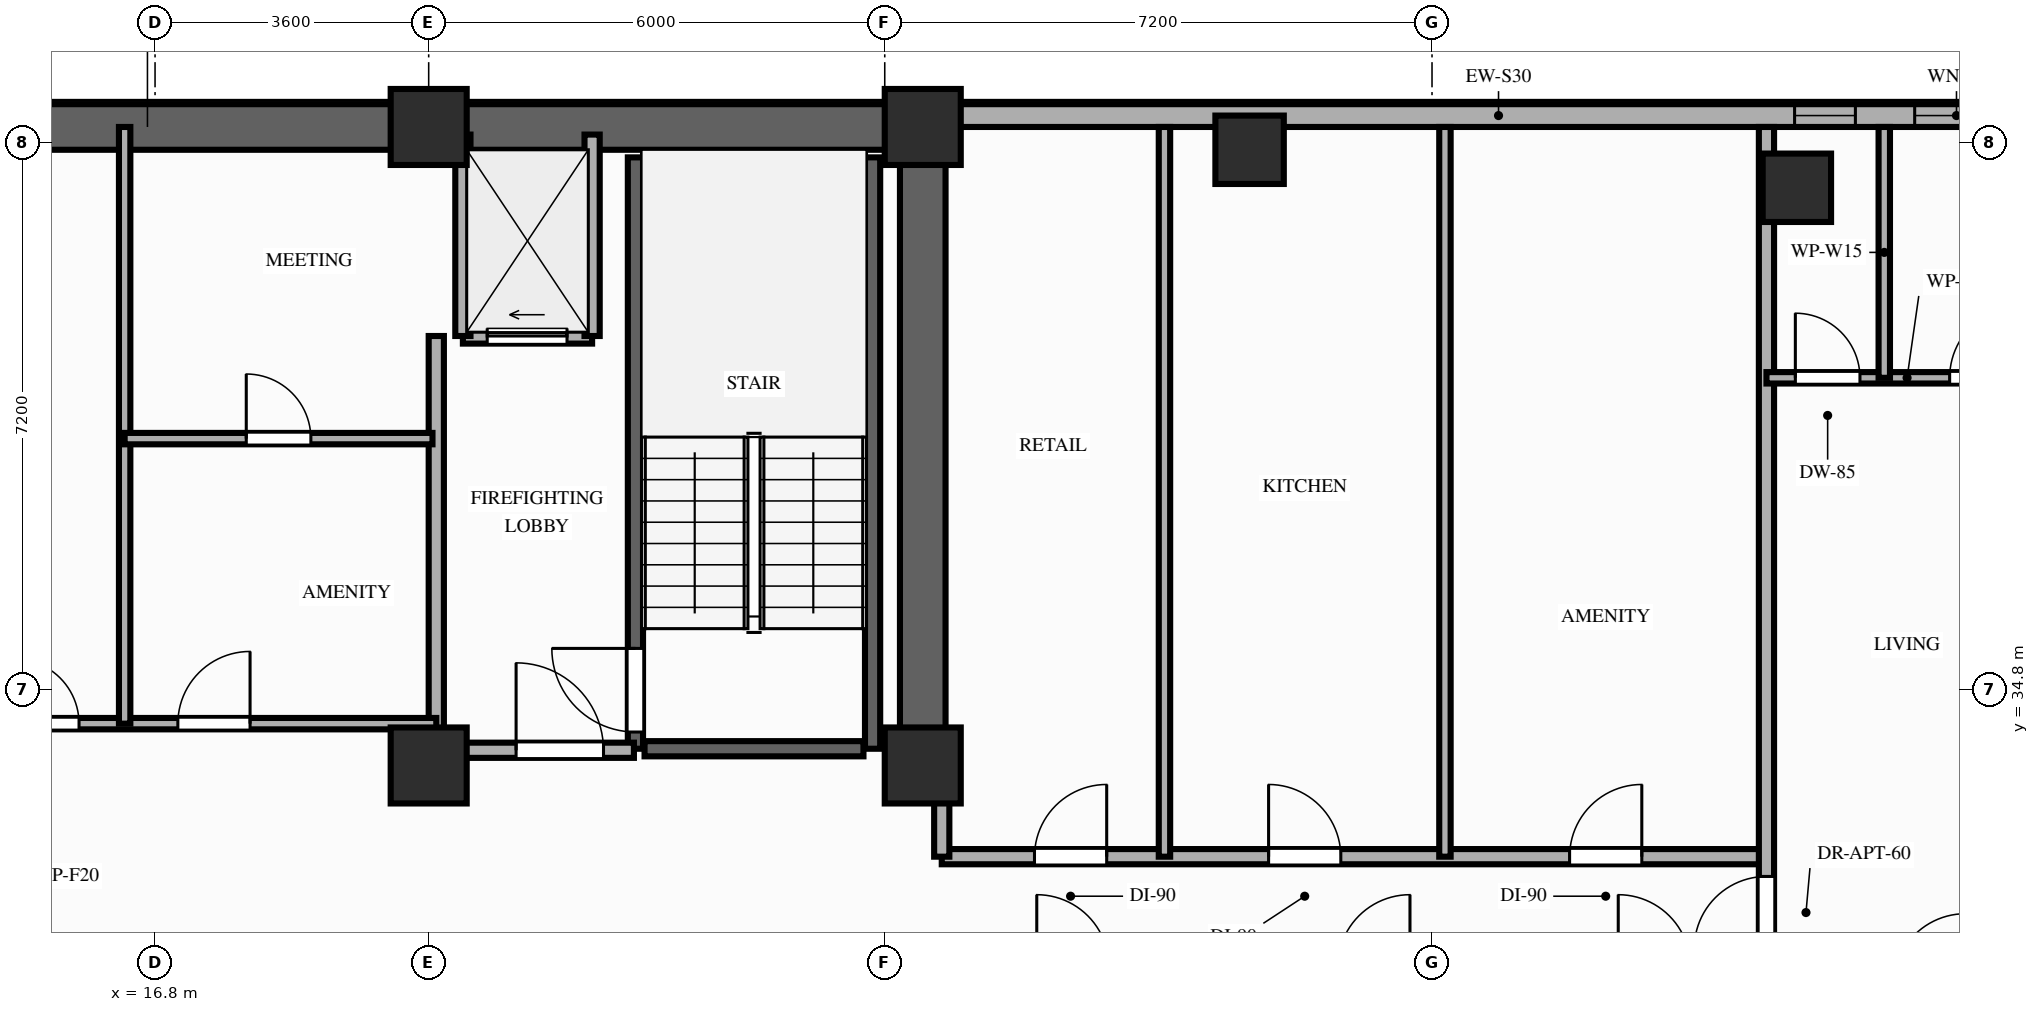
"""IFC4 building model, lengths in metres.
Left out: names, types, materials, properties, quantities, classifications, styles, units other than length and angle.
Written with IfcOpenShell. Run it as: python <this file> out.ifc"""

import sys

from ifc_helpers import new_model, si_unit, direction, frame, frame_2d, origin, origin_2d, place, context, subcontext, project, spatial, rectangle, extrude, element, fill, save


model = new_model("IFC4")
c1 = context("Model", 3, precision=1e-05, world=origin(), true_north=direction((0.0, 1.0)))
c2 = subcontext(c1, "Body", "Model", "MODEL_VIEW")
j1 = project(units=[si_unit("LENGTHUNIT", "METRE"), si_unit("PLANEANGLEUNIT", "RADIAN")], contexts=[c1])
p1 = place(None, origin())
s1 = spatial("IfcSite", under=j1, at=p1, CompositionType="ELEMENT")
p2 = place(p1, origin())
s2 = spatial("IfcBuilding", under=s1, at=p2, CompositionType="ELEMENT")
p3 = place(p2, frame((0.0, 0.0, 172.8)))
s3 = spatial("IfcBuildingStorey", under=s2, at=p3, CompositionType="ELEMENT", Elevation=172.8)
for number, where, z_axis, x_axis in (
    (1, (20.4, 33.8, 0.0), (0.0, 0.0, 1.0), (1.0, 0.0, 0.0)),
    (2, (26.9, 33.8, 0.0), (0.0, 0.0, 1.0), (1.0, 0.0, 0.0)),
    (3, (20.4, 42.2, 0.0), (0.0, 0.0, 1.0), (1.0, 0.0, 0.0)),
    (4, (26.9, 42.2, 0.0), (0.0, 0.0, 1.0), (1.0, 0.0, 0.0)),
):
    element("IfcColumn", number, at=place(p3, frame(where, z_axis=z_axis, x_axis=x_axis)), inside=s3, PredefinedType="COLUMN", context=c2, shape_type="SweptSolid", body=[
        extrude(rectangle(XDim=1.0, YDim=1.0, at=origin_2d()), origin(), (0.0, 0.0, 1.0), 3.2),
    ])
for number, where, z_axis, x_axis in (
    (5, (31.2, 41.9, 0.0), (0.0, 0.0, 1.0), (1.0, 0.0, 0.0)),
    (6, (38.4, 41.4, 0.0), (0.0, 0.0, 1.0), (1.0, 0.0, 0.0)),
):
    element("IfcColumn", number, at=place(p3, frame(where, z_axis=z_axis, x_axis=x_axis)), inside=s3, PredefinedType="COLUMN", context=c2, shape_type="SweptSolid", body=[
        extrude(rectangle(XDim=0.9, YDim=0.9, at=origin_2d()), origin(), (0.0, 0.0, 1.0), 3.2),
    ])
p4 = place(p3, frame((41.6, 42.35, 0.0), z_axis=(0.0, 0.0, 1.0), x_axis=(-1.0, 0.0, 0.0)))
e7 = element("IfcWall", 7, at=p4, inside=s3, PredefinedType="STANDARD", context=c2, shape_type="SweptSolid", body=[
    extrude(rectangle(XDim=14.25, YDim=0.3, at=frame_2d((7.125, 0.0))), origin(), (0.0, 0.0, 1.0), 2.45),
])
p5 = place(p4, frame((2.43, 0.0, 0.85)))
e8 = element("IfcOpeningElement", 8, at=p5, cuts=e7, PredefinedType="OPENING", context=c2, shape_type="SweptSolid", body=[
    extrude(rectangle(XDim=0.8, YDim=1.35, at=frame_2d((0.4, 0.675))), frame((0.0, 0.16, 0.0), z_axis=(0.0, -1.0, 0.0), x_axis=(1.0, 0.0, 0.0)), (0.0, 0.0, 1.0), 0.32),
])
p6 = place(p4, frame((0.55, 0.0, 0.85)))
e9 = element("IfcOpeningElement", 9, at=p6, cuts=e7, PredefinedType="OPENING", context=c2, shape_type="SweptSolid", body=[
    extrude(rectangle(XDim=1.1, YDim=1.35, at=frame_2d((0.55, 0.675))), frame((0.0, 0.16, 0.0), z_axis=(0.0, -1.0, 0.0), x_axis=(1.0, 0.0, 0.0)), (0.0, 0.0, 1.0), 0.32),
])
p7 = place(p3, frame((6.45, 42.2, 0.0), z_axis=(0.0, 0.0, 1.0), x_axis=(1.0, 0.0, 0.0)))
e10 = element("IfcWall", 10, at=p7, inside=s3, PredefinedType="SHEAR", context=c2, shape_type="SweptSolid", body=[
    extrude(rectangle(XDim=20.45, YDim=0.6, at=frame_2d((10.225, 0.0))), origin(), (0.0, 0.0, 1.0), 3.02),
])
p8 = place(p3, frame((26.9, 33.8, 0.0), z_axis=(0.0, 0.0, 1.0), x_axis=(0.0, 1.0, 0.0)))
e11 = element("IfcWall", 11, at=p8, inside=s3, PredefinedType="SHEAR", context=c2, shape_type="SweptSolid", body=[
    extrude(rectangle(XDim=7.95, YDim=0.6, at=frame_2d((3.975, 0.0))), origin(), (0.0, 0.0, 1.0), 3.02),
])
p9 = place(p3, frame((23.12, 34.02, 0.0), z_axis=(0.0, 0.0, 1.0), x_axis=(0.0, 1.0, 0.0)))
e12 = element("IfcWall", 12, at=p9, inside=s3, PredefinedType="SHEAR", context=c2, shape_type="SweptSolid", body=[
    extrude(rectangle(XDim=7.78, YDim=0.2, at=frame_2d((3.89, 0.0))), origin(), (0.0, 0.0, 1.0), 3.02),
])
p10 = place(p9, frame((0.22, 0.0, 0.0)))
e13 = element("IfcOpeningElement", 13, at=p10, cuts=e12, PredefinedType="OPENING", context=c2, shape_type="SweptSolid", body=[
    extrude(rectangle(XDim=1.1, YDim=2.15, at=frame_2d((0.55, 1.075))), frame((0.0, 0.11, 0.0), z_axis=(0.0, -1.0, 0.0), x_axis=(1.0, 0.0, 0.0)), (0.0, 0.0, 1.0), 0.22),
])
p11 = place(p3, frame((26.24, 34.02, 0.0), z_axis=(0.0, 0.0, 1.0), x_axis=(0.0, 1.0, 0.0)))
e14 = element("IfcWall", 14, at=p11, inside=s3, PredefinedType="SHEAR", context=c2, shape_type="SweptSolid", body=[
    extrude(rectangle(XDim=7.78, YDim=0.2, at=frame_2d((3.89, 0.0))), origin(), (0.0, 0.0, 1.0), 3.02),
])
p12 = place(p3, frame((23.24, 34.02, 0.0), z_axis=(0.0, 0.0, 1.0), x_axis=(1.0, 0.0, 0.0)))
e15 = element("IfcWall", 15, at=p12, inside=s3, PredefinedType="SHEAR", context=c2, shape_type="SweptSolid", body=[
    extrude(rectangle(XDim=2.88, YDim=0.2, at=frame_2d((1.44, 0.0))), origin(), (0.0, 0.0, 1.0), 3.02),
])
p13 = place(p3, frame((20.85, 39.45, 0.0), z_axis=(0.0, 0.0, 1.0), x_axis=(1.0, 0.0, 0.0)))
e16 = element("IfcWall", 16, at=p13, inside=s3, PredefinedType="MOVABLE", context=c2, shape_type="SweptSolid", body=[
    extrude(rectangle(XDim=1.7, YDim=0.2, at=frame_2d((0.85, 0.0))), origin(), (0.0, 0.0, 1.0), 3.02),
])
p14 = place(p13, frame((0.32, 0.0, 0.0)))
e17 = element("IfcOpeningElement", 17, at=p14, cuts=e16, PredefinedType="OPENING", context=c2, shape_type="SweptSolid", body=[
    extrude(rectangle(XDim=1.05, YDim=2.15, at=frame_2d((0.525, 1.075))), frame((0.0, 0.11, 0.0), z_axis=(0.0, -1.0, 0.0), x_axis=(1.0, 0.0, 0.0)), (0.0, 0.0, 1.0), 0.22),
])
for number, where, z_axis, x_axis in (
    (18, (20.85, 39.45, 0.0), (0.0, 0.0, 1.0), (0.0, 1.0, 0.0)),
    (19, (22.55, 39.45, 0.0), (0.0, 0.0, 1.0), (0.0, 1.0, 0.0)),
):
    element("IfcWall", number, at=place(p3, frame(where, z_axis=z_axis, x_axis=x_axis)), inside=s3, PredefinedType="MOVABLE", context=c2, shape_type="SweptSolid", body=[
        extrude(rectangle(XDim=2.65, YDim=0.2, at=frame_2d((1.325, 0.0))), origin(), (0.0, 0.0, 1.0), 2.45),
    ])
p15 = place(p3, frame((20.5, 34.0, 0.0), z_axis=(0.0, 0.0, 1.0), x_axis=(0.0, 1.0, 0.0)))
e20 = element("IfcWall", 20, at=p15, inside=s3, PredefinedType="PARTITIONING", context=c2, shape_type="SweptSolid", body=[
    extrude(rectangle(XDim=5.45, YDim=0.2, at=frame_2d((2.725, 0.0))), origin(), (0.0, 0.0, 1.0), 2.45),
])
p16 = place(p3, frame((20.5, 34.0, 0.0), z_axis=(0.0, 0.0, 1.0), x_axis=(1.0, 0.0, 0.0)))
e21 = element("IfcWall", 21, at=p16, inside=s3, PredefinedType="PARTITIONING", context=c2, shape_type="SweptSolid", body=[
    extrude(rectangle(XDim=2.6, YDim=0.2, at=frame_2d((1.3, 0.0))), origin(), (0.0, 0.0, 1.0), 2.45),
])
p17 = place(p16, frame((1.05, 0.0, 0.0)))
e22 = element("IfcOpeningElement", 22, at=p17, cuts=e21, PredefinedType="OPENING", context=c2, shape_type="SweptSolid", body=[
    extrude(rectangle(XDim=1.15, YDim=2.15, at=frame_2d((0.575, 1.075))), frame((0.0, 0.11, 0.0), z_axis=(0.0, -1.0, 0.0), x_axis=(1.0, 0.0, 0.0)), (0.0, 0.0, 1.0), 0.22),
])
p18 = place(p3, frame((12.9, 34.35, 0.0), z_axis=(0.0, 0.0, 1.0), x_axis=(1.0, 0.0, 0.0)))
e23 = element("IfcWall", 23, at=p18, inside=s3, PredefinedType="PARTITIONING", context=c2, shape_type="SweptSolid", body=[
    extrude(rectangle(XDim=7.6, YDim=0.15, at=frame_2d((3.8, 0.0))), origin(), (0.0, 0.0, 1.0), 3.02),
])
p19 = place(p18, frame((2.05, 0.0, 0.0)))
e24 = element("IfcOpeningElement", 24, at=p19, cuts=e23, PredefinedType="OPENING", context=c2, shape_type="SweptSolid", body=[
    extrude(rectangle(XDim=0.85, YDim=2.05, at=frame_2d((0.425, 1.025))), frame((0.0, 0.085, 0.0), z_axis=(0.0, -1.0, 0.0), x_axis=(1.0, 0.0, 0.0)), (0.0, 0.0, 1.0), 0.17),
])
p20 = place(p18, frame((4.2, 0.0, 0.0)))
e25 = element("IfcOpeningElement", 25, at=p20, cuts=e23, PredefinedType="OPENING", context=c2, shape_type="SweptSolid", body=[
    extrude(rectangle(XDim=0.95, YDim=2.15, at=frame_2d((0.475, 1.075))), frame((0.0, 0.085, 0.0), z_axis=(0.0, -1.0, 0.0), x_axis=(1.0, 0.0, 0.0)), (0.0, 0.0, 1.0), 0.17),
])
p21 = place(p3, frame((16.4, 34.35, 0.0), z_axis=(0.0, 0.0, 1.0), x_axis=(0.0, 1.0, 0.0)))
e26 = element("IfcWall", 26, at=p21, inside=s3, PredefinedType="PARTITIONING", context=c2, shape_type="SweptSolid", body=[
    extrude(rectangle(XDim=7.85, YDim=0.15, at=frame_2d((3.925, 0.0))), origin(), (0.0, 0.0, 1.0), 2.45),
])
p22 = place(p3, frame((16.4, 38.1, 0.0), z_axis=(0.0, 0.0, 1.0), x_axis=(1.0, 0.0, 0.0)))
e27 = element("IfcWall", 27, at=p22, inside=s3, PredefinedType="PARTITIONING", context=c2, shape_type="SweptSolid", body=[
    extrude(rectangle(XDim=4.05, YDim=0.15, at=frame_2d((2.025, 0.0))), origin(), (0.0, 0.0, 1.0), 3.02),
])
p23 = place(p22, frame((1.6, 0.0, 0.0)))
e28 = element("IfcOpeningElement", 28, at=p23, cuts=e27, PredefinedType="OPENING", context=c2, shape_type="SweptSolid", body=[
    extrude(rectangle(XDim=0.85, YDim=2.05, at=frame_2d((0.425, 1.025))), frame((0.0, 0.085, 0.0), z_axis=(0.0, -1.0, 0.0), x_axis=(1.0, 0.0, 0.0)), (0.0, 0.0, 1.0), 0.17),
])
p24 = place(p3, frame((27.15, 32.6, 0.0), z_axis=(0.0, 0.0, 1.0), x_axis=(1.0, 0.0, 0.0)))
e29 = element("IfcWall", 29, at=p24, inside=s3, PredefinedType="PARTITIONING", context=c2, shape_type="SweptSolid", body=[
    extrude(rectangle(XDim=10.85, YDim=0.2, at=frame_2d((5.425, 0.0))), origin(), (0.0, 0.0, 1.0), 2.45),
])
p25 = place(p24, frame((1.22, 0.0, 0.0)))
e30 = element("IfcOpeningElement", 30, at=p25, cuts=e29, PredefinedType="OPENING", context=c2, shape_type="SweptSolid", body=[
    extrude(rectangle(XDim=0.95, YDim=2.15, at=frame_2d((0.475, 1.075))), frame((0.0, 0.11, 0.0), z_axis=(0.0, -1.0, 0.0), x_axis=(1.0, 0.0, 0.0)), (0.0, 0.0, 1.0), 0.22),
])
p26 = place(p24, frame((4.3, 0.0, 0.0)))
e31 = element("IfcOpeningElement", 31, at=p26, cuts=e29, PredefinedType="OPENING", context=c2, shape_type="SweptSolid", body=[
    extrude(rectangle(XDim=0.95, YDim=2.15, at=frame_2d((0.475, 1.075))), frame((0.0, 0.11, 0.0), z_axis=(0.0, -1.0, 0.0), x_axis=(1.0, 0.0, 0.0)), (0.0, 0.0, 1.0), 0.22),
])
p27 = place(p24, frame((8.26, 0.0, 0.0)))
e32 = element("IfcOpeningElement", 32, at=p27, cuts=e29, PredefinedType="OPENING", context=c2, shape_type="SweptSolid", body=[
    extrude(rectangle(XDim=0.95, YDim=2.15, at=frame_2d((0.475, 1.075))), frame((0.0, 0.11, 0.0), z_axis=(0.0, -1.0, 0.0), x_axis=(1.0, 0.0, 0.0)), (0.0, 0.0, 1.0), 0.22),
])
p28 = place(p3, frame((27.15, 32.6, 0.0), z_axis=(0.0, 0.0, 1.0), x_axis=(0.0, 1.0, 0.0)))
e33 = element("IfcWall", 33, at=p28, inside=s3, PredefinedType="PARTITIONING", context=c2, shape_type="SweptSolid", body=[
    extrude(rectangle(XDim=1.08, YDim=0.2, at=frame_2d((0.54, 0.0))), origin(), (0.0, 0.0, 1.0), 2.45),
])
p29 = place(p3, frame((38.0, 26.75, 0.0), z_axis=(0.0, 0.0, 1.0), x_axis=(0.0, 1.0, 0.0)))
e34 = element("IfcWall", 34, at=p29, inside=s3, PredefinedType="PARTITIONING", context=c2, shape_type="SweptSolid", body=[
    extrude(rectangle(XDim=15.45, YDim=0.2, at=frame_2d((7.725, 0.0))), origin(), (0.0, 0.0, 1.0), 2.45),
])
p30 = place(p29, frame((4.64, 0.0, 0.0)))
e35 = element("IfcOpeningElement", 35, at=p30, cuts=e34, PredefinedType="OPENING", context=c2, shape_type="SweptSolid", body=[
    extrude(rectangle(XDim=0.95, YDim=2.15, at=frame_2d((0.475, 1.075))), frame((0.0, 0.11, 0.0), z_axis=(0.0, -1.0, 0.0), x_axis=(1.0, 0.0, 0.0)), (0.0, 0.0, 1.0), 0.22),
])
p31 = place(p3, frame((38.0, 38.9, 0.0), z_axis=(0.0, 0.0, 1.0), x_axis=(1.0, 0.0, 0.0)))
e36 = element("IfcWall", 36, at=p31, inside=s3, PredefinedType="PARTITIONING", context=c2, shape_type="SweptSolid", body=[
    extrude(rectangle(XDim=3.7, YDim=0.15, at=frame_2d((1.85, 0.0))), origin(), (0.0, 0.0, 1.0), 2.45),
])
p32 = place(p31, frame((0.38, 0.0, 0.0)))
e37 = element("IfcOpeningElement", 37, at=p32, cuts=e36, PredefinedType="OPENING", context=c2, shape_type="SweptSolid", body=[
    extrude(rectangle(XDim=0.85, YDim=2.1, at=frame_2d((0.425, 1.05))), frame((0.0, 0.085, 0.0), z_axis=(0.0, -1.0, 0.0), x_axis=(1.0, 0.0, 0.0)), (0.0, 0.0, 1.0), 0.17),
])
p33 = place(p31, frame((2.41, 0.0, 0.0)))
e38 = element("IfcOpeningElement", 38, at=p33, cuts=e36, PredefinedType="OPENING", context=c2, shape_type="SweptSolid", body=[
    extrude(rectangle(XDim=0.95, YDim=2.15, at=frame_2d((0.475, 1.075))), frame((0.0, 0.085, 0.0), z_axis=(0.0, -1.0, 0.0), x_axis=(1.0, 0.0, 0.0)), (0.0, 0.0, 1.0), 0.17),
])
p34 = place(p3, frame((39.55, 38.9, 0.0), z_axis=(0.0, 0.0, 1.0), x_axis=(0.0, 1.0, 0.0)))
e39 = element("IfcWall", 39, at=p34, inside=s3, PredefinedType="PARTITIONING", context=c2, shape_type="SweptSolid", body=[
    extrude(rectangle(XDim=3.3, YDim=0.15, at=frame_2d((1.65, 0.0))), origin(), (0.0, 0.0, 1.0), 2.45),
])
for number, where, z_axis, x_axis in (
    (40, (30.08, 32.6, 0.0), (0.0, 0.0, 1.0), (0.0, 1.0, 0.0)),
    (41, (33.77, 32.6, 0.0), (0.0, 0.0, 1.0), (0.0, 1.0, 0.0)),
):
    element("IfcWall", number, at=place(p3, frame(where, z_axis=z_axis, x_axis=x_axis)), inside=s3, PredefinedType="PARTITIONING", context=c2, shape_type="SweptSolid", body=[
        extrude(rectangle(XDim=9.6, YDim=0.15, at=frame_2d((4.8, 0.0))), origin(), (0.0, 0.0, 1.0), 2.45),
    ])
p35 = place(p5, origin())
e42 = element("IfcWindow", 42, at=p35, inside=s3, PartitioningType="SINGLE_PANEL", PredefinedType="WINDOW", context=c2, shape_type="SweptSolid", body=[
    extrude(rectangle(XDim=0.8, YDim=1.35, at=frame_2d((0.4, 0.675))), frame((0.0, 0.03, 0.0), z_axis=(0.0, -1.0, 0.0), x_axis=(1.0, 0.0, 0.0)), (0.0, 0.0, 1.0), 0.06),
])
fill(e8, e42)
p36 = place(p6, origin())
e43 = element("IfcWindow", 43, at=p36, inside=s3, PartitioningType="SINGLE_PANEL", PredefinedType="WINDOW", context=c2, shape_type="SweptSolid", body=[
    extrude(rectangle(XDim=1.1, YDim=1.35, at=frame_2d((0.55, 0.675))), frame((0.0, 0.03, 0.0), z_axis=(0.0, -1.0, 0.0), x_axis=(1.0, 0.0, 0.0)), (0.0, 0.0, 1.0), 0.06),
])
fill(e9, e43)
p37 = place(p10, origin())
e44 = element("IfcDoor", 44, at=p37, inside=s3, OperationType="SINGLE_SWING_RIGHT", PredefinedType="DOOR", context=c2, shape_type="SweptSolid", body=[
    extrude(rectangle(XDim=1.1, YDim=2.15, at=frame_2d((0.55, 1.075))), frame((0.0, 0.025, 0.0), z_axis=(0.0, -1.0, 0.0), x_axis=(1.0, 0.0, 0.0)), (0.0, 0.0, 1.0), 0.05),
])
fill(e13, e44)
p38 = place(p14, origin())
e45 = element("IfcDoor", 45, at=p38, inside=s3, OperationType="SLIDING_TO_LEFT", PredefinedType="DOOR", context=c2, shape_type="SweptSolid", body=[
    extrude(rectangle(XDim=1.05, YDim=2.15, at=frame_2d((0.525, 1.075))), frame((0.0, 0.025, 0.0), z_axis=(0.0, -1.0, 0.0), x_axis=(1.0, 0.0, 0.0)), (0.0, 0.0, 1.0), 0.05),
])
fill(e17, e45)
p39 = place(p17, origin())
e46 = element("IfcDoor", 46, at=p39, inside=s3, OperationType="SINGLE_SWING_LEFT", PredefinedType="DOOR", context=c2, shape_type="SweptSolid", body=[
    extrude(rectangle(XDim=1.15, YDim=2.15, at=frame_2d((0.575, 1.075))), frame((0.0, 0.025, 0.0), z_axis=(0.0, -1.0, 0.0), x_axis=(1.0, 0.0, 0.0)), (0.0, 0.0, 1.0), 0.05),
])
fill(e22, e46)
p40 = place(p19, origin())
e47 = element("IfcDoor", 47, at=p40, inside=s3, OperationType="SINGLE_SWING_LEFT", PredefinedType="DOOR", context=c2, shape_type="SweptSolid", body=[
    extrude(rectangle(XDim=0.85, YDim=2.05, at=frame_2d((0.425, 1.025))), frame((0.0, 0.025, 0.0), z_axis=(0.0, -1.0, 0.0), x_axis=(1.0, 0.0, 0.0)), (0.0, 0.0, 1.0), 0.05),
])
fill(e24, e47)
p41 = place(p20, origin())
e48 = element("IfcDoor", 48, at=p41, inside=s3, OperationType="SINGLE_SWING_RIGHT", PredefinedType="DOOR", context=c2, shape_type="SweptSolid", body=[
    extrude(rectangle(XDim=0.95, YDim=2.15, at=frame_2d((0.475, 1.075))), frame((0.0, 0.025, 0.0), z_axis=(0.0, -1.0, 0.0), x_axis=(1.0, 0.0, 0.0)), (0.0, 0.0, 1.0), 0.05),
])
fill(e25, e48)
p42 = place(p23, origin())
e49 = element("IfcDoor", 49, at=p42, inside=s3, OperationType="SINGLE_SWING_LEFT", PredefinedType="DOOR", context=c2, shape_type="SweptSolid", body=[
    extrude(rectangle(XDim=0.85, YDim=2.05, at=frame_2d((0.425, 1.025))), frame((0.0, 0.025, 0.0), z_axis=(0.0, -1.0, 0.0), x_axis=(1.0, 0.0, 0.0)), (0.0, 0.0, 1.0), 0.05),
])
fill(e28, e49)
p43 = place(p30, origin())
e50 = element("IfcDoor", 50, at=p43, inside=s3, OperationType="SINGLE_SWING_LEFT", PredefinedType="DOOR", context=c2, shape_type="SweptSolid", body=[
    extrude(rectangle(XDim=0.95, YDim=2.15, at=frame_2d((0.475, 1.075))), frame((0.0, 0.025, 0.0), z_axis=(0.0, -1.0, 0.0), x_axis=(1.0, 0.0, 0.0)), (0.0, 0.0, 1.0), 0.05),
])
fill(e35, e50)
p44 = place(p32, origin())
e51 = element("IfcDoor", 51, at=p44, inside=s3, OperationType="SINGLE_SWING_LEFT", PredefinedType="DOOR", context=c2, shape_type="SweptSolid", body=[
    extrude(rectangle(XDim=0.85, YDim=2.1, at=frame_2d((0.425, 1.05))), frame((0.0, 0.025, 0.0), z_axis=(0.0, -1.0, 0.0), x_axis=(1.0, 0.0, 0.0)), (0.0, 0.0, 1.0), 0.05),
])
fill(e37, e51)
p45 = place(p33, origin())
e52 = element("IfcDoor", 52, at=p45, inside=s3, OperationType="SINGLE_SWING_RIGHT", PredefinedType="DOOR", context=c2, shape_type="SweptSolid", body=[
    extrude(rectangle(XDim=0.95, YDim=2.15, at=frame_2d((0.475, 1.075))), frame((0.0, 0.025, 0.0), z_axis=(0.0, -1.0, 0.0), x_axis=(1.0, 0.0, 0.0)), (0.0, 0.0, 1.0), 0.05),
])
fill(e38, e52)
p46 = place(p25, origin())
e53 = element("IfcDoor", 53, at=p46, inside=s3, OperationType="SINGLE_SWING_RIGHT", PredefinedType="DOOR", context=c2, shape_type="SweptSolid", body=[
    extrude(rectangle(XDim=0.95, YDim=2.15, at=frame_2d((0.475, 1.075))), frame((0.0, 0.025, 0.0), z_axis=(0.0, -1.0, 0.0), x_axis=(1.0, 0.0, 0.0)), (0.0, 0.0, 1.0), 0.05),
])
fill(e30, e53)
p47 = place(p26, origin())
e54 = element("IfcDoor", 54, at=p47, inside=s3, OperationType="SINGLE_SWING_LEFT", PredefinedType="DOOR", context=c2, shape_type="SweptSolid", body=[
    extrude(rectangle(XDim=0.95, YDim=2.15, at=frame_2d((0.475, 1.075))), frame((0.0, 0.025, 0.0), z_axis=(0.0, -1.0, 0.0), x_axis=(1.0, 0.0, 0.0)), (0.0, 0.0, 1.0), 0.05),
])
fill(e31, e54)
p48 = place(p27, origin())
e55 = element("IfcDoor", 55, at=p48, inside=s3, OperationType="SINGLE_SWING_RIGHT", PredefinedType="DOOR", context=c2, shape_type="SweptSolid", body=[
    extrude(rectangle(XDim=0.95, YDim=2.15, at=frame_2d((0.475, 1.075))), frame((0.0, 0.025, 0.0), z_axis=(0.0, -1.0, 0.0), x_axis=(1.0, 0.0, 0.0)), (0.0, 0.0, 1.0), 0.05),
])
fill(e32, e55)
save(model, sys.argv[1])
